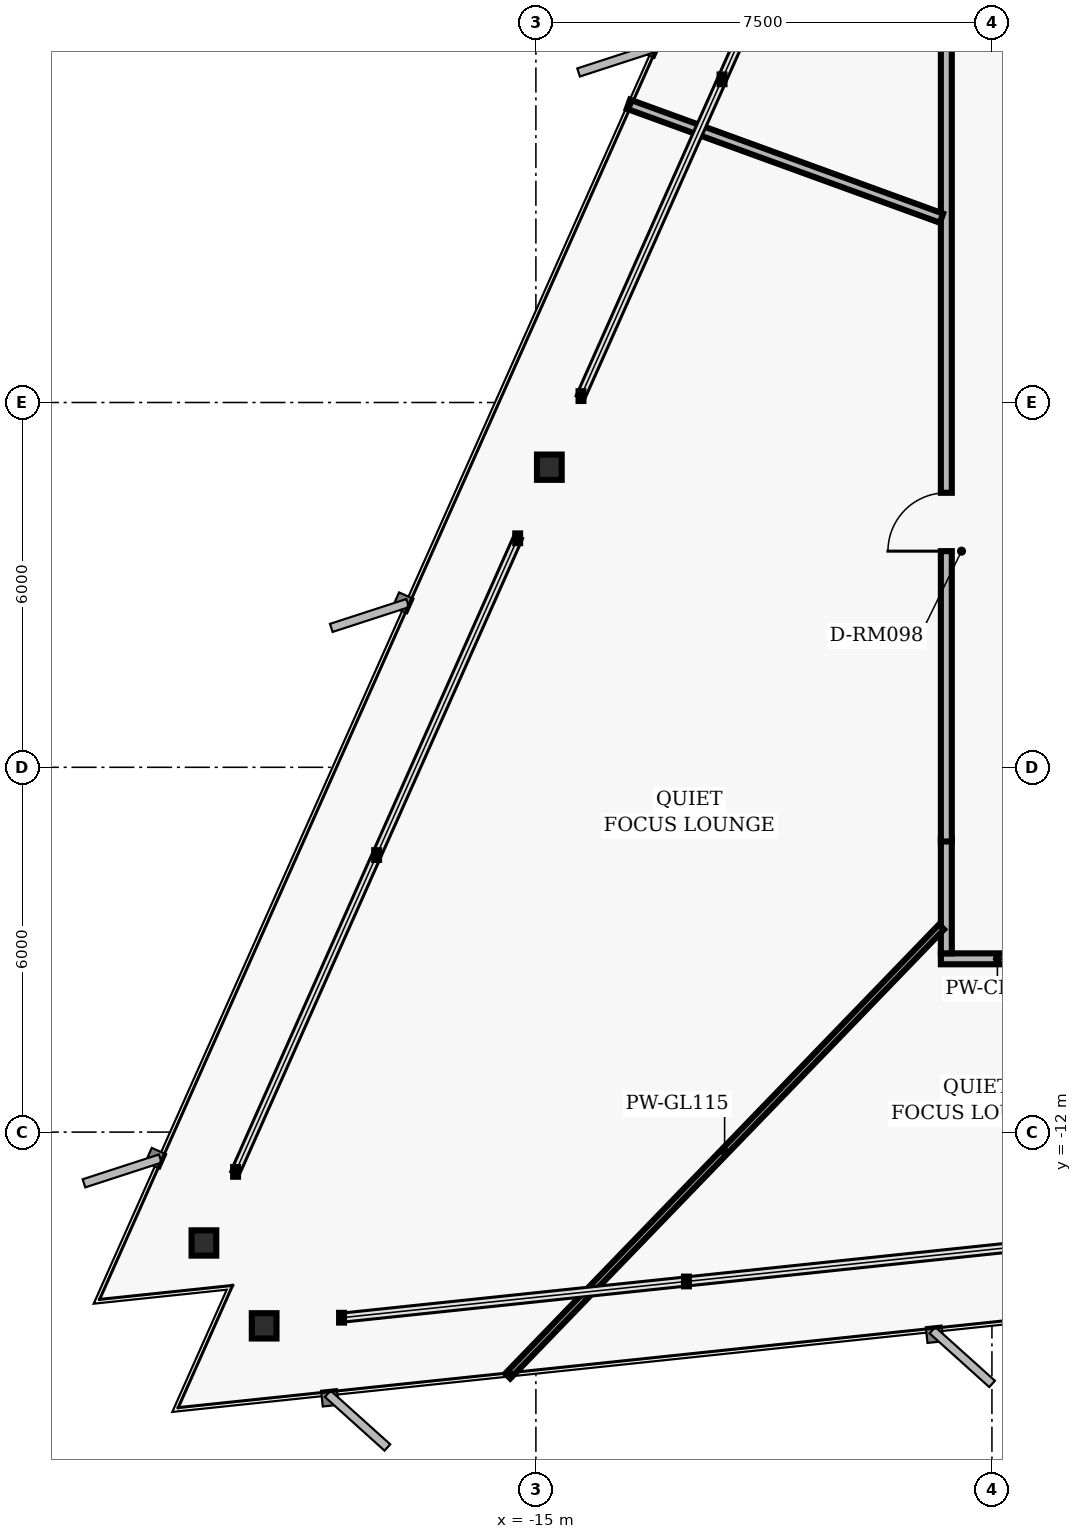
"""IFC4 building model, lengths in metres.
Left out: names, types, materials, properties, quantities, classifications, styles, units other than length and angle.
Written with IfcOpenShell. Run it as: python <this file> out.ifc"""

import sys

from ifc_helpers import new_model, si_unit, direction, frame, frame_2d, origin, origin_2d, place, context, subcontext, project, spatial, rectangle, i_section, extrude, element, fill, save


model = new_model("IFC4")
c1 = context("Model", 3, precision=1e-05, world=origin(), true_north=direction((0.0, 1.0)))
c2 = subcontext(c1, "Body", "Model", "MODEL_VIEW")
j1 = project(units=[si_unit("LENGTHUNIT", "METRE"), si_unit("PLANEANGLEUNIT", "RADIAN")], contexts=[c1])
p1 = place(None, origin())
s1 = spatial("IfcSite", under=j1, at=p1, CompositionType="ELEMENT")
p2 = place(p1, origin())
s2 = spatial("IfcBuilding", under=s1, at=p2, CompositionType="ELEMENT")
p3 = place(p2, frame((0.0, 0.0, 119.84)))
s3 = spatial("IfcBuildingStorey", under=s2, at=p3, CompositionType="ELEMENT", Elevation=119.84)
for number, where, z_axis, x_axis in (
    (1, (-14.779, -1.064, 0.0), (0.0, 0.0, 1.0), (1.0, 0.0, 0.0)),
    (2, (-20.46, -13.823, 0.0), (0.0, 0.0, 1.0), (1.0, 0.0, 0.0)),
    (3, (-19.469, -15.187, 0.0), (0.0, 0.0, 1.0), (1.0, 0.0, 0.0)),
):
    element("IfcColumn", number, at=place(p3, frame(where, z_axis=z_axis, x_axis=x_axis)), inside=s3, PredefinedType="COLUMN", context=c2, shape_type="SweptSolid", body=[
        extrude(i_section(OverallWidth=0.406, OverallDepth=0.416, WebThickness=0.03, FlangeThickness=0.048, FilletRadius=0.02, at=origin_2d()), origin(), (0.0, 0.0, 1.0), 3.04),
    ])
p4 = place(p3, frame((-6.48, -9.15, 0.0), z_axis=(0.0, 0.0, 1.0), x_axis=(-1.0, 0.0, 0.0)))
e4 = element("IfcWall", 4, at=p4, inside=s3, PredefinedType="PARTITIONING", context=c2, shape_type="SweptSolid", body=[
    extrude(rectangle(XDim=1.86, YDim=0.18, at=frame_2d((0.93, 0.0))), origin(), (0.0, 0.0, 1.0), 2.33),
])
p5 = place(p3, frame((-8.25, -9.06, 0.0), z_axis=(0.0, 0.0, 1.0), x_axis=(0.0, 1.0, 0.0)))
e5 = element("IfcWall", 5, at=p5, inside=s3, PredefinedType="PARTITIONING", context=c2, shape_type="SweptSolid", body=[
    extrude(rectangle(XDim=1.88, YDim=0.18, at=frame_2d((0.94, 0.0))), origin(), (0.0, 0.0, 1.0), 2.763),
])
p6 = place(p3, frame((-8.25, -7.22, 0.0), z_axis=(0.0, 0.0, 1.0), x_axis=(0.0, 1.0, 0.0)))
e6 = element("IfcWall", 6, at=p6, inside=s3, PredefinedType="PARTITIONING", context=c2, shape_type="SweptSolid", body=[
    extrude(rectangle(XDim=14.44, YDim=0.18, at=frame_2d((7.22, 0.0))), origin(), (0.0, 0.0, 1.0), 2.33),
])
p7 = place(p6, frame((4.775, 0.0, 0.0)))
e7 = element("IfcOpeningElement", 7, at=p7, cuts=e6, PredefinedType="OPENING", context=c2, shape_type="SweptSolid", body=[
    extrude(rectangle(XDim=0.96, YDim=2.02, at=frame_2d((0.48, 1.01))), frame((0.0, 0.1, 0.0), z_axis=(0.0, -1.0, 0.0), x_axis=(1.0, 0.0, 0.0)), (0.0, 0.0, 1.0), 0.2),
])
p8 = place(p3, frame((-8.33, -8.626, 0.0), z_axis=(0.0, 0.0, 1.0), x_axis=(-0.694659007852, -0.719339184815, 0.0)))
e8 = element("IfcWall", 8, at=p8, inside=s3, PredefinedType="MOVABLE", context=c2, shape_type="SweptSolid", body=[
    extrude(rectangle(XDim=10.268, YDim=0.115, at=frame_2d((5.134, 0.0))), origin(), (0.0, 0.0, 1.0), 2.763),
])
p9 = place(p3, frame((-8.33, 3.032, 0.0), z_axis=(0.0, 0.0, 1.0), x_axis=(-0.939693198397, 0.342018556347, 0.0)))
e9 = element("IfcWall", 9, at=p9, inside=s3, PredefinedType="PARTITIONING", context=c2, shape_type="SweptSolid", body=[
    extrude(rectangle(XDim=5.479, YDim=0.16, at=frame_2d((2.739, 0.0))), origin(), (0.0, 0.0, 1.0), 2.763),
])
p10 = place(p7, origin())
e10 = element("IfcDoor", 10, at=p10, inside=s3, OperationType="SINGLE_SWING_LEFT", PredefinedType="DOOR", context=c2, shape_type="SweptSolid", body=[
    extrude(rectangle(XDim=0.96, YDim=2.02, at=frame_2d((0.48, 1.01))), frame((0.0, 0.025, 0.0), z_axis=(0.0, -1.0, 0.0), x_axis=(1.0, 0.0, 0.0)), (0.0, 0.0, 1.0), 0.05),
])
fill(e7, e10)
save(model, sys.argv[1])
